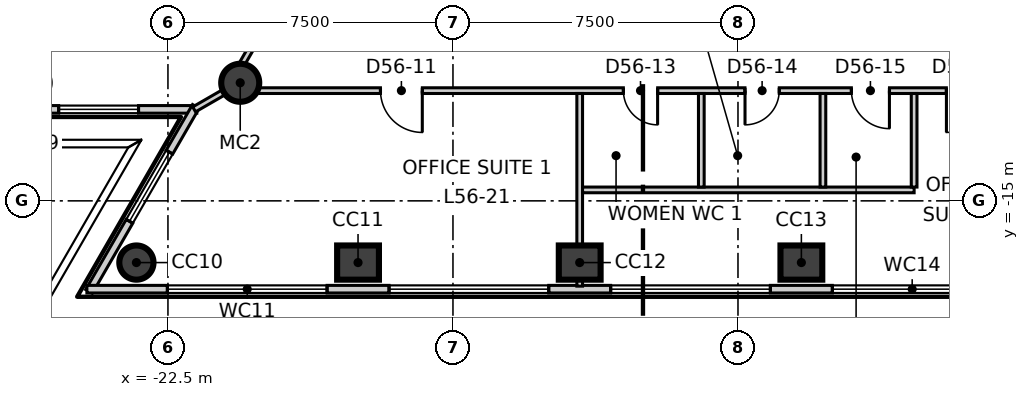
"""IFC4 building model, lengths in metres.
Left out: names, types, materials, properties, quantities, classifications, styles, units other than length and angle.
Written with IfcOpenShell. Run it as: python <this file> out.ifc"""

import sys

from ifc_helpers import new_model, si_unit, direction, frame, frame_2d, origin, origin_2d, place, context, subcontext, project, spatial, rectangle, circle, extrude, element, fill, save


model = new_model("IFC4")
c1 = context("Model", 3, precision=1e-05, world=origin(), true_north=direction((0.0, 1.0)))
c2 = subcontext(c1, "Body", "Model", "MODEL_VIEW")
j1 = project(units=[si_unit("LENGTHUNIT", "METRE"), si_unit("PLANEANGLEUNIT", "RADIAN")], contexts=[c1])
p1 = place(None, origin())
s1 = spatial("IfcSite", under=j1, at=p1, CompositionType="ELEMENT")
p2 = place(p1, origin())
s2 = spatial("IfcBuilding", under=s1, at=p2, CompositionType="ELEMENT")
p3 = place(p2, frame((0.0, 0.0, 239.3)))
s3 = spatial("IfcBuildingStorey", under=s2, at=p3, CompositionType="ELEMENT", Elevation=239.3)
p4 = place(p3, frame((-23.33, -16.624, -0.3), z_axis=(0.0, 0.0, 1.0), x_axis=(1.0, 0.0, 0.0)))
e1 = element("IfcColumn", 1, at=p4, inside=s3, PredefinedType="COLUMN", context=c2, shape_type="SweptSolid", body=[
    extrude(circle(Radius=0.45, at=origin_2d()), origin(), (0.0, 0.0, 1.0), 4.0),
])
for number, where, z_axis, x_axis in (
    (2, (-17.498, -16.624, -0.3), (0.0, 0.0, 1.0), (1.0, 0.0, 0.0)),
    (3, (-11.665, -16.624, -0.3), (0.0, 0.0, 1.0), (1.0, 0.0, 0.0)),
    (4, (-5.832, -16.624, -0.3), (0.0, 0.0, 1.0), (1.0, 0.0, 0.0)),
):
    element("IfcColumn", number, at=place(p3, frame(where, z_axis=z_axis, x_axis=x_axis)), inside=s3, PredefinedType="COLUMN", context=c2, shape_type="SweptSolid", body=[
        extrude(rectangle(XDim=1.1, YDim=0.9, at=origin_2d()), origin(), (0.0, 0.0, 1.0), 4.0),
    ])
p5 = place(p3, frame((-20.598, -11.893, -0.3), z_axis=(0.0, 0.0, 1.0), x_axis=(1.0, 0.0, 0.0)))
e5 = element("IfcColumn", 5, at=p5, inside=s3, PredefinedType="COLUMN", context=c2, shape_type="SweptSolid", body=[
    extrude(circle(Radius=0.5, at=origin_2d()), origin(), (0.0, 0.0, 1.0), 4.0),
])
p6 = place(p3, frame((-2.687, 29.995, 0.0), z_axis=(0.0, 0.0, 1.0), x_axis=(-0.499992950893, -0.86602947355, 0.0)))
e6 = element("IfcWall", 6, at=p6, inside=s3, PredefinedType="ELEMENTEDWALL", context=c2, shape_type="SweptSolid", body=[
    extrude(rectangle(XDim=49.247, YDim=0.2, at=frame_2d((24.624, 0.0))), origin(), (0.0, 0.0, 1.0), 3.7),
])
p7 = place(p6, frame((2.119, 0.0, 0.9)))
e7 = element("IfcOpeningElement", 7, at=p7, cuts=e6, PredefinedType="OPENING", context=c2, shape_type="SweptSolid", body=[
    extrude(rectangle(XDim=4.2, YDim=2.5, at=frame_2d((2.1, 1.25))), frame((0.0, 0.11, 0.0), z_axis=(0.0, -1.0, 0.0), x_axis=(1.0, 0.0, 0.0)), (0.0, 0.0, 1.0), 0.22),
])
p8 = place(p6, frame((7.951, 0.0, 0.9)))
e8 = element("IfcOpeningElement", 8, at=p8, cuts=e6, PredefinedType="OPENING", context=c2, shape_type="SweptSolid", body=[
    extrude(rectangle(XDim=4.2, YDim=2.5, at=frame_2d((2.1, 1.25))), frame((0.0, 0.11, 0.0), z_axis=(0.0, -1.0, 0.0), x_axis=(1.0, 0.0, 0.0)), (0.0, 0.0, 1.0), 0.22),
])
p9 = place(p6, frame((13.784, 0.0, 0.9)))
e9 = element("IfcOpeningElement", 9, at=p9, cuts=e6, PredefinedType="OPENING", context=c2, shape_type="SweptSolid", body=[
    extrude(rectangle(XDim=4.2, YDim=2.5, at=frame_2d((2.1, 1.25))), frame((0.0, 0.11, 0.0), z_axis=(0.0, -1.0, 0.0), x_axis=(1.0, 0.0, 0.0)), (0.0, 0.0, 1.0), 0.22),
])
p10 = place(p6, frame((19.617, 0.0, 0.9)))
e10 = element("IfcOpeningElement", 10, at=p10, cuts=e6, PredefinedType="OPENING", context=c2, shape_type="SweptSolid", body=[
    extrude(rectangle(XDim=4.2, YDim=2.5, at=frame_2d((2.1, 1.25))), frame((0.0, 0.11, 0.0), z_axis=(0.0, -1.0, 0.0), x_axis=(1.0, 0.0, 0.0)), (0.0, 0.0, 1.0), 0.22),
])
p11 = place(p6, frame((25.449, 0.0, 0.9)))
e11 = element("IfcOpeningElement", 11, at=p11, cuts=e6, PredefinedType="OPENING", context=c2, shape_type="SweptSolid", body=[
    extrude(rectangle(XDim=4.2, YDim=2.5, at=frame_2d((2.1, 1.25))), frame((0.0, 0.11, 0.0), z_axis=(0.0, -1.0, 0.0), x_axis=(1.0, 0.0, 0.0)), (0.0, 0.0, 1.0), 0.22),
])
p12 = place(p6, frame((31.282, 0.0, 0.9)))
e12 = element("IfcOpeningElement", 12, at=p12, cuts=e6, PredefinedType="OPENING", context=c2, shape_type="SweptSolid", body=[
    extrude(rectangle(XDim=4.2, YDim=2.5, at=frame_2d((2.1, 1.25))), frame((0.0, 0.11, 0.0), z_axis=(0.0, -1.0, 0.0), x_axis=(1.0, 0.0, 0.0)), (0.0, 0.0, 1.0), 0.22),
])
p13 = place(p6, frame((37.115, 0.0, 0.9)))
e13 = element("IfcOpeningElement", 13, at=p13, cuts=e6, PredefinedType="OPENING", context=c2, shape_type="SweptSolid", body=[
    extrude(rectangle(XDim=4.2, YDim=2.5, at=frame_2d((2.1, 1.25))), frame((0.0, 0.11, 0.0), z_axis=(0.0, -1.0, 0.0), x_axis=(1.0, 0.0, 0.0)), (0.0, 0.0, 1.0), 0.22),
])
p14 = place(p6, frame((42.947, 0.0, 0.9)))
e14 = element("IfcOpeningElement", 14, at=p14, cuts=e6, PredefinedType="OPENING", context=c2, shape_type="SweptSolid", body=[
    extrude(rectangle(XDim=4.2, YDim=2.5, at=frame_2d((2.1, 1.25))), frame((0.0, 0.11, 0.0), z_axis=(0.0, -1.0, 0.0), x_axis=(1.0, 0.0, 0.0)), (0.0, 0.0, 1.0), 0.22),
])
p15 = place(p3, frame((-27.365, -12.593, 0.0), z_axis=(0.0, 0.0, 1.0), x_axis=(1.0, 0.0, 0.0)))
e15 = element("IfcWall", 15, at=p15, inside=s3, PredefinedType="ELEMENTEDWALL", context=c2, shape_type="SweptSolid", body=[
    extrude(rectangle(XDim=5.624, YDim=0.2, at=frame_2d((2.812, 0.0))), origin(), (0.0, 0.0, 1.0), 3.7),
])
p16 = place(p15, frame((1.99, 0.0, 0.9)))
e16 = element("IfcOpeningElement", 16, at=p16, cuts=e15, PredefinedType="OPENING", context=c2, shape_type="SweptSolid", body=[
    extrude(rectangle(XDim=2.1, YDim=2.5, at=frame_2d((1.05, 1.25))), frame((0.0, 0.11, 0.0), z_axis=(0.0, -1.0, 0.0), x_axis=(1.0, 0.0, 0.0)), (0.0, 0.0, 1.0), 0.22),
])
p17 = place(p3, frame((-21.766, -12.515, 0.0), z_axis=(0.0, 0.0, 1.0), x_axis=(-0.500000548001, -0.866025087395, 0.0)))
e17 = element("IfcWall", 17, at=p17, inside=s3, PredefinedType="ELEMENTEDWALL", context=c2, shape_type="SweptSolid", body=[
    extrude(rectangle(XDim=5.624, YDim=0.2, at=frame_2d((2.812, 0.0))), origin(), (0.0, 0.0, 1.0), 3.7),
])
p18 = place(p17, frame((1.39, 0.0, 0.9)))
e18 = element("IfcOpeningElement", 18, at=p18, cuts=e17, PredefinedType="OPENING", context=c2, shape_type="SweptSolid", body=[
    extrude(rectangle(XDim=2.1, YDim=2.5, at=frame_2d((1.05, 1.25))), frame((0.0, 0.11, 0.0), z_axis=(0.0, -1.0, 0.0), x_axis=(1.0, 0.0, 0.0)), (0.0, 0.0, 1.0), 0.22),
])
p19 = place(p3, frame((-24.633, -17.324, 0.0), z_axis=(0.0, 0.0, 1.0), x_axis=(1.0, 0.0, 0.0)))
e19 = element("IfcWall", 19, at=p19, inside=s3, PredefinedType="ELEMENTEDWALL", context=c2, shape_type="SweptSolid", body=[
    extrude(rectangle(XDim=49.246, YDim=0.2, at=frame_2d((24.623, 0.0))), origin(), (0.0, 0.0, 1.0), 3.7),
])
p20 = place(p19, frame((2.119, 0.0, 0.9)))
e20 = element("IfcOpeningElement", 20, at=p20, cuts=e19, PredefinedType="OPENING", context=c2, shape_type="SweptSolid", body=[
    extrude(rectangle(XDim=4.2, YDim=2.5, at=frame_2d((2.1, 1.25))), frame((0.0, 0.11, 0.0), z_axis=(0.0, -1.0, 0.0), x_axis=(1.0, 0.0, 0.0)), (0.0, 0.0, 1.0), 0.22),
])
p21 = place(p19, frame((7.952, 0.0, 0.9)))
e21 = element("IfcOpeningElement", 21, at=p21, cuts=e19, PredefinedType="OPENING", context=c2, shape_type="SweptSolid", body=[
    extrude(rectangle(XDim=4.2, YDim=2.5, at=frame_2d((2.1, 1.25))), frame((0.0, 0.11, 0.0), z_axis=(0.0, -1.0, 0.0), x_axis=(1.0, 0.0, 0.0)), (0.0, 0.0, 1.0), 0.22),
])
p22 = place(p19, frame((13.784, 0.0, 0.9)))
e22 = element("IfcOpeningElement", 22, at=p22, cuts=e19, PredefinedType="OPENING", context=c2, shape_type="SweptSolid", body=[
    extrude(rectangle(XDim=4.2, YDim=2.5, at=frame_2d((2.1, 1.25))), frame((0.0, 0.11, 0.0), z_axis=(0.0, -1.0, 0.0), x_axis=(1.0, 0.0, 0.0)), (0.0, 0.0, 1.0), 0.22),
])
p23 = place(p19, frame((19.617, 0.0, 0.9)))
e23 = element("IfcOpeningElement", 23, at=p23, cuts=e19, PredefinedType="OPENING", context=c2, shape_type="SweptSolid", body=[
    extrude(rectangle(XDim=4.2, YDim=2.5, at=frame_2d((2.1, 1.25))), frame((0.0, 0.11, 0.0), z_axis=(0.0, -1.0, 0.0), x_axis=(1.0, 0.0, 0.0)), (0.0, 0.0, 1.0), 0.22),
])
p24 = place(p19, frame((25.449, 0.0, 0.9)))
e24 = element("IfcOpeningElement", 24, at=p24, cuts=e19, PredefinedType="OPENING", context=c2, shape_type="SweptSolid", body=[
    extrude(rectangle(XDim=4.2, YDim=2.5, at=frame_2d((2.1, 1.25))), frame((0.0, 0.11, 0.0), z_axis=(0.0, -1.0, 0.0), x_axis=(1.0, 0.0, 0.0)), (0.0, 0.0, 1.0), 0.22),
])
p25 = place(p19, frame((31.282, 0.0, 0.9)))
e25 = element("IfcOpeningElement", 25, at=p25, cuts=e19, PredefinedType="OPENING", context=c2, shape_type="SweptSolid", body=[
    extrude(rectangle(XDim=4.2, YDim=2.5, at=frame_2d((2.1, 1.25))), frame((0.0, 0.11, 0.0), z_axis=(0.0, -1.0, 0.0), x_axis=(1.0, 0.0, 0.0)), (0.0, 0.0, 1.0), 0.22),
])
p26 = place(p19, frame((37.114, 0.0, 0.9)))
e26 = element("IfcOpeningElement", 26, at=p26, cuts=e19, PredefinedType="OPENING", context=c2, shape_type="SweptSolid", body=[
    extrude(rectangle(XDim=4.2, YDim=2.5, at=frame_2d((2.1, 1.25))), frame((0.0, 0.11, 0.0), z_axis=(0.0, -1.0, 0.0), x_axis=(1.0, 0.0, 0.0)), (0.0, 0.0, 1.0), 0.22),
])
p27 = place(p19, frame((42.947, 0.0, 0.9)))
e27 = element("IfcOpeningElement", 27, at=p27, cuts=e19, PredefinedType="OPENING", context=c2, shape_type="SweptSolid", body=[
    extrude(rectangle(XDim=4.2, YDim=2.5, at=frame_2d((2.1, 1.25))), frame((0.0, 0.11, 0.0), z_axis=(0.0, -1.0, 0.0), x_axis=(1.0, 0.0, 0.0)), (0.0, 0.0, 1.0), 0.22),
])
p28 = place(p3, frame((-21.811, -12.593, 0.0), z_axis=(0.0, 0.0, 1.0), x_axis=(0.866086641072, 0.499893918903, 0.0)))
e28 = element("IfcWall", 28, at=p28, inside=s3, PredefinedType="PARTITIONING", context=c2, shape_type="SweptSolid", body=[
    extrude(rectangle(XDim=0.986, YDim=0.15, at=frame_2d((0.493, 0.0))), origin(), (0.0, 0.0, 1.0), 3.7),
])
p29 = place(p3, frame((-20.807, -12.1, 0.0), z_axis=(0.0, 0.0, 1.0), x_axis=(1.0, 0.0, 0.0)))
e29 = element("IfcWall", 29, at=p29, inside=s3, PredefinedType="PARTITIONING", context=c2, shape_type="SweptSolid", body=[
    extrude(rectangle(XDim=41.764, YDim=0.15, at=frame_2d((20.882, 0.0))), origin(), (0.0, 0.0, 1.0), 3.7),
])
p30 = place(p29, frame((3.9, 0.0, 0.0)))
e30 = element("IfcOpeningElement", 30, at=p30, cuts=e29, PredefinedType="OPENING", context=c2, shape_type="SweptSolid", body=[
    extrude(rectangle(XDim=1.1, YDim=2.1, at=frame_2d((0.55, 1.05))), frame((0.0, 0.085, 0.0), z_axis=(0.0, -1.0, 0.0), x_axis=(1.0, 0.0, 0.0)), (0.0, 0.0, 1.0), 0.17),
])
p31 = place(p29, frame((18.792, 0.0, 0.0)))
e31 = element("IfcOpeningElement", 31, at=p31, cuts=e29, PredefinedType="OPENING", context=c2, shape_type="SweptSolid", body=[
    extrude(rectangle(XDim=1.1, YDim=2.1, at=frame_2d((0.55, 1.05))), frame((0.0, 0.085, 0.0), z_axis=(0.0, -1.0, 0.0), x_axis=(1.0, 0.0, 0.0)), (0.0, 0.0, 1.0), 0.17),
])
p32 = place(p29, frame((10.292, 0.0, 0.0)))
e32 = element("IfcOpeningElement", 32, at=p32, cuts=e29, PredefinedType="OPENING", context=c2, shape_type="SweptSolid", body=[
    extrude(rectangle(XDim=0.9, YDim=2.1, at=frame_2d((0.45, 1.05))), frame((0.0, 0.085, 0.0), z_axis=(0.0, -1.0, 0.0), x_axis=(1.0, 0.0, 0.0)), (0.0, 0.0, 1.0), 0.17),
])
p33 = place(p29, frame((13.492, 0.0, 0.0)))
e33 = element("IfcOpeningElement", 33, at=p33, cuts=e29, PredefinedType="OPENING", context=c2, shape_type="SweptSolid", body=[
    extrude(rectangle(XDim=0.9, YDim=2.1, at=frame_2d((0.45, 1.05))), frame((0.0, 0.085, 0.0), z_axis=(0.0, -1.0, 0.0), x_axis=(1.0, 0.0, 0.0)), (0.0, 0.0, 1.0), 0.17),
])
p34 = place(p29, frame((16.292, 0.0, 0.0)))
e34 = element("IfcOpeningElement", 34, at=p34, cuts=e29, PredefinedType="OPENING", context=c2, shape_type="SweptSolid", body=[
    extrude(rectangle(XDim=1.0, YDim=2.1, at=frame_2d((0.5, 1.05))), frame((0.0, 0.085, 0.0), z_axis=(0.0, -1.0, 0.0), x_axis=(1.0, 0.0, 0.0)), (0.0, 0.0, 1.0), 0.17),
])
p35 = place(p29, frame((29.057, 0.0, 0.0)))
e35 = element("IfcOpeningElement", 35, at=p35, cuts=e29, PredefinedType="OPENING", context=c2, shape_type="SweptSolid", body=[
    extrude(rectangle(XDim=1.1, YDim=2.1, at=frame_2d((0.55, 1.05))), frame((0.0, 0.085, 0.0), z_axis=(0.0, -1.0, 0.0), x_axis=(1.0, 0.0, 0.0)), (0.0, 0.0, 1.0), 0.17),
])
p36 = place(p29, frame((22.157, 0.0, 0.0)))
e36 = element("IfcOpeningElement", 36, at=p36, cuts=e29, PredefinedType="OPENING", context=c2, shape_type="SweptSolid", body=[
    extrude(rectangle(XDim=0.9, YDim=2.1, at=frame_2d((0.45, 1.05))), frame((0.0, 0.085, 0.0), z_axis=(0.0, -1.0, 0.0), x_axis=(1.0, 0.0, 0.0)), (0.0, 0.0, 1.0), 0.17),
])
p37 = place(p29, frame((25.157, 0.0, 0.0)))
e37 = element("IfcOpeningElement", 37, at=p37, cuts=e29, PredefinedType="OPENING", context=c2, shape_type="SweptSolid", body=[
    extrude(rectangle(XDim=0.9, YDim=2.1, at=frame_2d((0.45, 1.05))), frame((0.0, 0.085, 0.0), z_axis=(0.0, -1.0, 0.0), x_axis=(1.0, 0.0, 0.0)), (0.0, 0.0, 1.0), 0.17),
])
p38 = place(p29, frame((36.522, 0.0, 0.0)))
e38 = element("IfcOpeningElement", 38, at=p38, cuts=e29, PredefinedType="OPENING", context=c2, shape_type="SweptSolid", body=[
    extrude(rectangle(XDim=1.1, YDim=2.1, at=frame_2d((0.55, 1.05))), frame((0.0, 0.085, 0.0), z_axis=(0.0, -1.0, 0.0), x_axis=(1.0, 0.0, 0.0)), (0.0, 0.0, 1.0), 0.17),
])
p39 = place(p3, frame((-20.883, -11.97, 0.0), z_axis=(0.0, 0.0, 1.0), x_axis=(0.500006150555, 0.866021852731, 0.0)))
e39 = element("IfcWall", 39, at=p39, inside=s3, PredefinedType="PARTITIONING", context=c2, shape_type="SweptSolid", body=[
    extrude(rectangle(XDim=41.766, YDim=0.15, at=frame_2d((20.883, 0.0))), origin(), (0.0, 0.0, 1.0), 3.7),
])
p40 = place(p39, frame((36.616, 0.0, 0.0)))
e40 = element("IfcOpeningElement", 40, at=p40, cuts=e39, PredefinedType="OPENING", context=c2, shape_type="SweptSolid", body=[
    extrude(rectangle(XDim=1.1, YDim=2.1, at=frame_2d((0.55, 1.05))), frame((0.0, 0.085, 0.0), z_axis=(0.0, -1.0, 0.0), x_axis=(1.0, 0.0, 0.0)), (0.0, 0.0, 1.0), 0.17),
])
p41 = place(p39, frame((21.723, 0.0, 0.0)))
e41 = element("IfcOpeningElement", 41, at=p41, cuts=e39, PredefinedType="OPENING", context=c2, shape_type="SweptSolid", body=[
    extrude(rectangle(XDim=1.1, YDim=2.1, at=frame_2d((0.55, 1.05))), frame((0.0, 0.085, 0.0), z_axis=(0.0, -1.0, 0.0), x_axis=(1.0, 0.0, 0.0)), (0.0, 0.0, 1.0), 0.17),
])
p42 = place(p39, frame((30.423, 0.0, 0.0)))
e42 = element("IfcOpeningElement", 42, at=p42, cuts=e39, PredefinedType="OPENING", context=c2, shape_type="SweptSolid", body=[
    extrude(rectangle(XDim=0.9, YDim=2.1, at=frame_2d((0.45, 1.05))), frame((0.0, 0.085, 0.0), z_axis=(0.0, -1.0, 0.0), x_axis=(1.0, 0.0, 0.0)), (0.0, 0.0, 1.0), 0.17),
])
p43 = place(p39, frame((27.223, 0.0, 0.0)))
e43 = element("IfcOpeningElement", 43, at=p43, cuts=e39, PredefinedType="OPENING", context=c2, shape_type="SweptSolid", body=[
    extrude(rectangle(XDim=0.9, YDim=2.1, at=frame_2d((0.45, 1.05))), frame((0.0, 0.085, 0.0), z_axis=(0.0, -1.0, 0.0), x_axis=(1.0, 0.0, 0.0)), (0.0, 0.0, 1.0), 0.17),
])
p44 = place(p39, frame((24.323, 0.0, 0.0)))
e44 = element("IfcOpeningElement", 44, at=p44, cuts=e39, PredefinedType="OPENING", context=c2, shape_type="SweptSolid", body=[
    extrude(rectangle(XDim=1.0, YDim=2.1, at=frame_2d((0.5, 1.05))), frame((0.0, 0.085, 0.0), z_axis=(0.0, -1.0, 0.0), x_axis=(1.0, 0.0, 0.0)), (0.0, 0.0, 1.0), 0.17),
])
p45 = place(p39, frame((17.358, 0.0, 0.0)))
e45 = element("IfcOpeningElement", 45, at=p45, cuts=e39, PredefinedType="OPENING", context=c2, shape_type="SweptSolid", body=[
    extrude(rectangle(XDim=1.0, YDim=2.1, at=frame_2d((0.5, 1.05))), frame((0.0, 0.085, 0.0), z_axis=(0.0, -1.0, 0.0), x_axis=(1.0, 0.0, 0.0)), (0.0, 0.0, 1.0), 0.17),
])
p46 = place(p39, frame((6.825, 0.0, 0.0)))
e46 = element("IfcOpeningElement", 46, at=p46, cuts=e39, PredefinedType="OPENING", context=c2, shape_type="SweptSolid", body=[
    extrude(rectangle(XDim=1.1, YDim=2.1, at=frame_2d((0.55, 1.05))), frame((0.0, 0.085, 0.0), z_axis=(0.0, -1.0, 0.0), x_axis=(1.0, 0.0, 0.0)), (0.0, 0.0, 1.0), 0.17),
])
p47 = place(p3, frame((-11.665, -17.244, 0.0), z_axis=(0.0, 0.0, 1.0), x_axis=(0.0, 1.0, 0.0)))
e47 = element("IfcWall", 47, at=p47, inside=s3, PredefinedType="PARTITIONING", context=c2, shape_type="SweptSolid", body=[
    extrude(rectangle(XDim=5.069, YDim=0.15, at=frame_2d((2.534, 0.0))), origin(), (0.0, 0.0, 1.0), 3.7),
])
p48 = place(p3, frame((-11.59, -14.712, 0.0), z_axis=(0.0, 0.0, 1.0), x_axis=(1.0, 0.0, 0.0)))
e48 = element("IfcWall", 48, at=p48, inside=s3, PredefinedType="PARTITIONING", context=c2, shape_type="SweptSolid", body=[
    extrude(rectangle(XDim=8.725, YDim=0.15, at=frame_2d((4.363, 0.0))), origin(), (0.0, 0.0, 1.0), 3.7),
])
for number, where, z_axis, x_axis in (
    (49, (-8.465, -14.637, 0.0), (0.0, 0.0, 1.0), (0.0, 1.0, 0.0)),
    (50, (-2.865, -14.637, 0.0), (0.0, 0.0, 1.0), (0.0, 1.0, 0.0)),
    (51, (-5.265, -14.637, 0.0), (0.0, 0.0, 1.0), (0.0, 1.0, 0.0)),
):
    element("IfcWall", number, at=place(p3, frame(where, z_axis=z_axis, x_axis=x_axis)), inside=s3, PredefinedType="PARTITIONING", context=c2, shape_type="SweptSolid", body=[
        extrude(rectangle(XDim=2.462, YDim=0.15, at=frame_2d((1.231, 0.0))), origin(), (0.0, 0.0, 1.0), 3.7),
    ])
p49 = place(p16, origin())
e52 = element("IfcWindow", 52, at=p49, inside=s3, PartitioningType="SINGLE_PANEL", PredefinedType="WINDOW", context=c2, shape_type="SweptSolid", body=[
    extrude(rectangle(XDim=2.1, YDim=2.5, at=frame_2d((1.05, 1.25))), frame((0.0, 0.03, 0.0), z_axis=(0.0, -1.0, 0.0), x_axis=(1.0, 0.0, 0.0)), (0.0, 0.0, 1.0), 0.06),
])
fill(e16, e52)
p50 = place(p18, origin())
e53 = element("IfcWindow", 53, at=p50, inside=s3, PartitioningType="SINGLE_PANEL", PredefinedType="WINDOW", context=c2, shape_type="SweptSolid", body=[
    extrude(rectangle(XDim=2.1, YDim=2.5, at=frame_2d((1.05, 1.25))), frame((0.0, 0.03, 0.0), z_axis=(0.0, -1.0, 0.0), x_axis=(1.0, 0.0, 0.0)), (0.0, 0.0, 1.0), 0.06),
])
fill(e18, e53)
p51 = place(p20, origin())
e54 = element("IfcWindow", 54, at=p51, inside=s3, PartitioningType="SINGLE_PANEL", PredefinedType="WINDOW", context=c2, shape_type="SweptSolid", body=[
    extrude(rectangle(XDim=4.2, YDim=2.5, at=frame_2d((2.1, 1.25))), frame((0.0, 0.03, 0.0), z_axis=(0.0, -1.0, 0.0), x_axis=(1.0, 0.0, 0.0)), (0.0, 0.0, 1.0), 0.06),
])
fill(e20, e54)
p52 = place(p21, origin())
e55 = element("IfcWindow", 55, at=p52, inside=s3, PartitioningType="SINGLE_PANEL", PredefinedType="WINDOW", context=c2, shape_type="SweptSolid", body=[
    extrude(rectangle(XDim=4.2, YDim=2.5, at=frame_2d((2.1, 1.25))), frame((0.0, 0.03, 0.0), z_axis=(0.0, -1.0, 0.0), x_axis=(1.0, 0.0, 0.0)), (0.0, 0.0, 1.0), 0.06),
])
fill(e21, e55)
p53 = place(p22, origin())
e56 = element("IfcWindow", 56, at=p53, inside=s3, PartitioningType="SINGLE_PANEL", PredefinedType="WINDOW", context=c2, shape_type="SweptSolid", body=[
    extrude(rectangle(XDim=4.2, YDim=2.5, at=frame_2d((2.1, 1.25))), frame((0.0, 0.03, 0.0), z_axis=(0.0, -1.0, 0.0), x_axis=(1.0, 0.0, 0.0)), (0.0, 0.0, 1.0), 0.06),
])
fill(e22, e56)
p54 = place(p23, origin())
e57 = element("IfcWindow", 57, at=p54, inside=s3, PartitioningType="SINGLE_PANEL", PredefinedType="WINDOW", context=c2, shape_type="SweptSolid", body=[
    extrude(rectangle(XDim=4.2, YDim=2.5, at=frame_2d((2.1, 1.25))), frame((0.0, 0.03, 0.0), z_axis=(0.0, -1.0, 0.0), x_axis=(1.0, 0.0, 0.0)), (0.0, 0.0, 1.0), 0.06),
])
fill(e23, e57)
p55 = place(p30, origin())
e58 = element("IfcDoor", 58, at=p55, inside=s3, OperationType="SINGLE_SWING_RIGHT", PredefinedType="DOOR", context=c2, shape_type="SweptSolid", body=[
    extrude(rectangle(XDim=1.1, YDim=2.1, at=frame_2d((0.55, 1.05))), frame((0.0, 0.025, 0.0), z_axis=(0.0, -1.0, 0.0), x_axis=(1.0, 0.0, 0.0)), (0.0, 0.0, 1.0), 0.05),
])
fill(e30, e58)
p56 = place(p31, origin())
e59 = element("IfcDoor", 59, at=p56, inside=s3, OperationType="SINGLE_SWING_LEFT", PredefinedType="DOOR", context=c2, shape_type="SweptSolid", body=[
    extrude(rectangle(XDim=1.1, YDim=2.1, at=frame_2d((0.55, 1.05))), frame((0.0, 0.025, 0.0), z_axis=(0.0, -1.0, 0.0), x_axis=(1.0, 0.0, 0.0)), (0.0, 0.0, 1.0), 0.05),
])
fill(e31, e59)
p57 = place(p32, origin())
e60 = element("IfcDoor", 60, at=p57, inside=s3, OperationType="SINGLE_SWING_RIGHT", PredefinedType="DOOR", context=c2, shape_type="SweptSolid", body=[
    extrude(rectangle(XDim=0.9, YDim=2.1, at=frame_2d((0.45, 1.05))), frame((0.0, 0.025, 0.0), z_axis=(0.0, -1.0, 0.0), x_axis=(1.0, 0.0, 0.0)), (0.0, 0.0, 1.0), 0.05),
])
fill(e32, e60)
p58 = place(p33, origin())
e61 = element("IfcDoor", 61, at=p58, inside=s3, OperationType="SINGLE_SWING_LEFT", PredefinedType="DOOR", context=c2, shape_type="SweptSolid", body=[
    extrude(rectangle(XDim=0.9, YDim=2.1, at=frame_2d((0.45, 1.05))), frame((0.0, 0.025, 0.0), z_axis=(0.0, -1.0, 0.0), x_axis=(1.0, 0.0, 0.0)), (0.0, 0.0, 1.0), 0.05),
])
fill(e33, e61)
p59 = place(p34, origin())
e62 = element("IfcDoor", 62, at=p59, inside=s3, OperationType="SINGLE_SWING_RIGHT", PredefinedType="DOOR", context=c2, shape_type="SweptSolid", body=[
    extrude(rectangle(XDim=1.0, YDim=2.1, at=frame_2d((0.5, 1.05))), frame((0.0, 0.025, 0.0), z_axis=(0.0, -1.0, 0.0), x_axis=(1.0, 0.0, 0.0)), (0.0, 0.0, 1.0), 0.05),
])
fill(e34, e62)
save(model, sys.argv[1])
